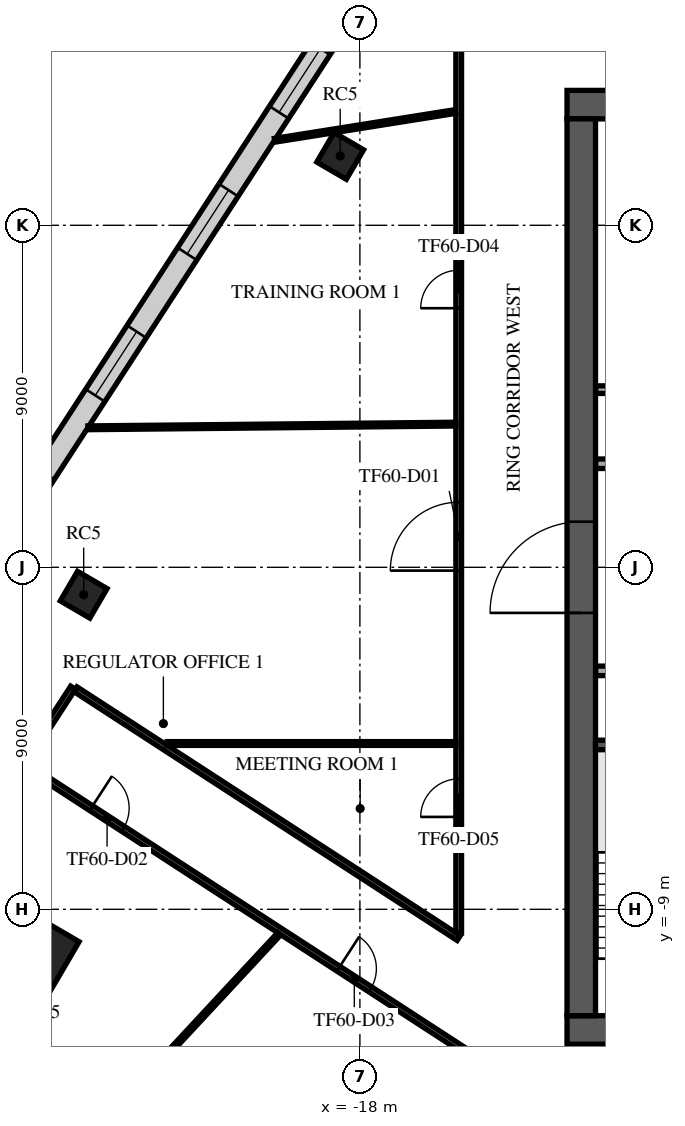
"""IFC4 building model, lengths in metres.
Left out: names, types, materials, properties, quantities, classifications, styles, units other than length and angle.
Written with IfcOpenShell. Run it as: python <this file> out.ifc"""

import sys

from ifc_helpers import new_model, si_unit, direction, frame, frame_2d, origin, origin_2d, place, context, subcontext, project, spatial, rectangle, extrude, element, fill, save


model = new_model("IFC4")
c1 = context("Model", 3, precision=1e-05, world=origin(), true_north=direction((0.0, 1.0)))
c2 = subcontext(c1, "Body", "Model", "MODEL_VIEW")
j1 = project(units=[si_unit("LENGTHUNIT", "METRE"), si_unit("PLANEANGLEUNIT", "RADIAN")], contexts=[c1])
p1 = place(None, origin())
s1 = spatial("IfcSite", under=j1, at=p1, CompositionType="ELEMENT")
p2 = place(p1, origin())
s2 = spatial("IfcBuilding", under=s1, at=p2, CompositionType="ELEMENT")
p3 = place(p2, frame((0.0, 0.0, 254.9)))
s3 = spatial("IfcBuildingStorey", under=s2, at=p3, CompositionType="ELEMENT", Elevation=254.9)
for number, where, z_axis, x_axis in (
    (1, (-18.518, 10.825, 0.0), (0.0, 0.0, 1.0), (0.505, 0.863, 0.0)),
    (2, (-25.268, -0.722, 0.0), (0.0, 0.0, 1.0), (0.505, 0.863, 0.0)),
):
    element("IfcColumn", number, at=place(p3, frame(where, z_axis=z_axis, x_axis=x_axis)), inside=s3, PredefinedType="COLUMN", context=c2, shape_type="SweptSolid", body=[
        extrude(rectangle(XDim=0.9, YDim=0.9, at=origin_2d()), origin(), (0.0, 0.0, 1.0), 4.0),
    ])
p4 = place(p3, frame((-26.415, -10.122, 0.0), z_axis=(0.0, 0.0, 1.0), x_axis=(0.504643651291, 0.863327739165, 0.0)))
e3 = element("IfcColumn", 3, at=p4, inside=s3, PredefinedType="COLUMN", context=c2, shape_type="SweptSolid", body=[
    extrude(rectangle(XDim=1.5, YDim=1.5, at=origin_2d()), origin(), (0.0, 0.0, 1.0), 4.0),
])
p5 = place(p3, frame((-12.55, 12.175, 0.0), z_axis=(0.0, 0.0, 1.0), x_axis=(1.0, 0.0, 0.0)))
e4 = element("IfcWall", 4, at=p5, inside=s3, PredefinedType="SHEAR", context=c2, shape_type="SweptSolid", body=[
    extrude(rectangle(XDim=25.1, YDim=0.75, at=frame_2d((12.55, 0.0))), origin(), (0.0, 0.0, 1.0), 3.64),
])
p6 = place(p5, frame((11.35, 0.0, 0.0)))
e5 = element("IfcOpeningElement", 5, at=p6, cuts=e4, PredefinedType="OPENING", context=c2, shape_type="SweptSolid", body=[
    extrude(rectangle(XDim=2.4, YDim=2.4, at=frame_2d((1.2, 1.2))), frame((0.0, 0.385, 0.0), z_axis=(0.0, -1.0, 0.0), x_axis=(1.0, 0.0, 0.0)), (0.0, 0.0, 1.0), 0.77),
])
p7 = place(p5, frame((22.175, 0.0, 0.0)))
e6 = element("IfcOpeningElement", 6, at=p7, cuts=e4, PredefinedType="OPENING", context=c2, shape_type="SweptSolid", body=[
    extrude(rectangle(XDim=1.2, YDim=2.1, at=frame_2d((0.6, 1.05))), frame((0.0, 0.385, 0.0), z_axis=(0.0, -1.0, 0.0), x_axis=(1.0, 0.0, 0.0)), (0.0, 0.0, 1.0), 0.77),
])
p8 = place(p5, frame((1.15, 0.0, 0.0)))
e7 = element("IfcOpeningElement", 7, at=p8, cuts=e4, PredefinedType="OPENING", context=c2, shape_type="SweptSolid", body=[
    extrude(rectangle(XDim=1.0, YDim=2.1, at=frame_2d((0.5, 1.05))), frame((0.0, 0.385, 0.0), z_axis=(0.0, -1.0, 0.0), x_axis=(1.0, 0.0, 0.0)), (0.0, 0.0, 1.0), 0.77),
])
p9 = place(p3, frame((-12.55, -12.175, 0.0), z_axis=(0.0, 0.0, 1.0), x_axis=(1.0, 0.0, 0.0)))
e8 = element("IfcWall", 8, at=p9, inside=s3, PredefinedType="SHEAR", context=c2, shape_type="SweptSolid", body=[
    extrude(rectangle(XDim=25.1, YDim=0.75, at=frame_2d((12.55, 0.0))), origin(), (0.0, 0.0, 1.0), 3.64),
])
p10 = place(p9, frame((7.45, 0.0, 0.0)))
e9 = element("IfcOpeningElement", 9, at=p10, cuts=e8, PredefinedType="OPENING", context=c2, shape_type="SweptSolid", body=[
    extrude(rectangle(XDim=2.0, YDim=2.1, at=frame_2d((1.0, 1.05))), frame((0.0, 0.385, 0.0), z_axis=(0.0, -1.0, 0.0), x_axis=(1.0, 0.0, 0.0)), (0.0, 0.0, 1.0), 0.77),
])
p11 = place(p9, frame((17.575, 0.0, 0.0)))
e10 = element("IfcOpeningElement", 10, at=p11, cuts=e8, PredefinedType="OPENING", context=c2, shape_type="SweptSolid", body=[
    extrude(rectangle(XDim=1.2, YDim=2.1, at=frame_2d((0.6, 1.05))), frame((0.0, 0.385, 0.0), z_axis=(0.0, -1.0, 0.0), x_axis=(1.0, 0.0, 0.0)), (0.0, 0.0, 1.0), 0.77),
])
p12 = place(p9, frame((1.725, 0.0, 0.0)))
e11 = element("IfcOpeningElement", 11, at=p12, cuts=e8, PredefinedType="OPENING", context=c2, shape_type="SweptSolid", body=[
    extrude(rectangle(XDim=1.2, YDim=2.1, at=frame_2d((0.6, 1.05))), frame((0.0, 0.385, 0.0), z_axis=(0.0, -1.0, 0.0), x_axis=(1.0, 0.0, 0.0)), (0.0, 0.0, 1.0), 0.77),
])
p13 = place(p9, frame((22.175, 0.0, 0.0)))
e12 = element("IfcOpeningElement", 12, at=p13, cuts=e8, PredefinedType="OPENING", context=c2, shape_type="SweptSolid", body=[
    extrude(rectangle(XDim=1.2, YDim=2.1, at=frame_2d((0.6, 1.05))), frame((0.0, 0.385, 0.0), z_axis=(0.0, -1.0, 0.0), x_axis=(1.0, 0.0, 0.0)), (0.0, 0.0, 1.0), 0.77),
])
p14 = place(p3, frame((-12.175, -11.8, 0.0), z_axis=(0.0, 0.0, 1.0), x_axis=(0.0, 1.0, 0.0)))
e13 = element("IfcWall", 13, at=p14, inside=s3, PredefinedType="SHEAR", context=c2, shape_type="SweptSolid", body=[
    extrude(rectangle(XDim=23.6, YDim=0.75, at=frame_2d((11.8, 0.0))), origin(), (0.0, 0.0, 1.0), 3.64),
])
p15 = place(p14, frame((10.6, 0.0, 0.0)))
e14 = element("IfcOpeningElement", 14, at=p15, cuts=e13, PredefinedType="OPENING", context=c2, shape_type="SweptSolid", body=[
    extrude(rectangle(XDim=2.4, YDim=2.4, at=frame_2d((1.2, 1.2))), frame((0.0, 0.385, 0.0), z_axis=(0.0, -1.0, 0.0), x_axis=(1.0, 0.0, 0.0)), (0.0, 0.0, 1.0), 0.77),
])
p16 = place(p3, frame((-8.65, -4.675, 0.0), z_axis=(0.0, 0.0, 1.0), x_axis=(-1.0, 0.0, 0.0)))
e15 = element("IfcWall", 15, at=p16, inside=s3, PredefinedType="SOLIDWALL", context=c2, shape_type="SweptSolid", body=[
    extrude(rectangle(XDim=3.15, YDim=0.25, at=frame_2d((1.575, 0.0))), origin(), (0.0, 0.0, 1.0), 3.64),
])
p17 = place(p3, frame((-11.795, -2.725, 0.0), z_axis=(0.0, 0.0, 1.0), x_axis=(1.0, 0.0, 0.0)))
e16 = element("IfcWall", 16, at=p17, inside=s3, PredefinedType="PARTITIONING", context=c2, shape_type="SweptSolid", body=[
    extrude(rectangle(XDim=14.415, YDim=0.25, at=frame_2d((7.208, 0.0))), origin(), (0.0, 0.0, 1.0), 3.64),
])
p18 = place(p17, frame((1.295, 0.0, 0.0)))
e17 = element("IfcOpeningElement", 17, at=p18, cuts=e16, PredefinedType="OPENING", context=c2, shape_type="SweptSolid", body=[
    extrude(rectangle(XDim=1.0, YDim=2.1, at=frame_2d((0.5, 1.05))), frame((0.0, 0.135, 0.0), z_axis=(0.0, -1.0, 0.0), x_axis=(1.0, 0.0, 0.0)), (0.0, 0.0, 1.0), 0.27),
])
p19 = place(p17, frame((4.42, 0.0, 0.0)))
e18 = element("IfcOpeningElement", 18, at=p19, cuts=e16, PredefinedType="OPENING", context=c2, shape_type="SweptSolid", body=[
    extrude(rectangle(XDim=1.0, YDim=2.1, at=frame_2d((0.5, 1.05))), frame((0.0, 0.135, 0.0), z_axis=(0.0, -1.0, 0.0), x_axis=(1.0, 0.0, 0.0)), (0.0, 0.0, 1.0), 0.27),
])
p20 = place(p17, frame((9.92, 0.0, 0.0)))
e19 = element("IfcOpeningElement", 19, at=p20, cuts=e16, PredefinedType="OPENING", context=c2, shape_type="SweptSolid", body=[
    extrude(rectangle(XDim=1.0, YDim=2.1, at=frame_2d((0.5, 1.05))), frame((0.0, 0.135, 0.0), z_axis=(0.0, -1.0, 0.0), x_axis=(1.0, 0.0, 0.0)), (0.0, 0.0, 1.0), 0.27),
])
p21 = place(p3, frame((-11.795, 2.725, 0.0), z_axis=(0.0, 0.0, 1.0), x_axis=(1.0, 0.0, 0.0)))
e20 = element("IfcWall", 20, at=p21, inside=s3, PredefinedType="PARTITIONING", context=c2, shape_type="SweptSolid", body=[
    extrude(rectangle(XDim=23.59, YDim=0.25, at=frame_2d((11.795, 0.0))), origin(), (0.0, 0.0, 1.0), 3.64),
])
p22 = place(p21, frame((21.345, 0.0, 0.0)))
e21 = element("IfcOpeningElement", 21, at=p22, cuts=e20, PredefinedType="OPENING", context=c2, shape_type="SweptSolid", body=[
    extrude(rectangle(XDim=0.9, YDim=2.1, at=frame_2d((0.45, 1.05))), frame((0.0, 0.135, 0.0), z_axis=(0.0, -1.0, 0.0), x_axis=(1.0, 0.0, 0.0)), (0.0, 0.0, 1.0), 0.27),
])
p23 = place(p21, frame((1.345, 0.0, 0.0)))
e22 = element("IfcOpeningElement", 22, at=p23, cuts=e20, PredefinedType="OPENING", context=c2, shape_type="SweptSolid", body=[
    extrude(rectangle(XDim=0.9, YDim=2.1, at=frame_2d((0.45, 1.05))), frame((0.0, 0.135, 0.0), z_axis=(0.0, -1.0, 0.0), x_axis=(1.0, 0.0, 0.0)), (0.0, 0.0, 1.0), 0.27),
])
p24 = place(p21, frame((4.32, 0.0, 0.0)))
e23 = element("IfcOpeningElement", 23, at=p24, cuts=e20, PredefinedType="OPENING", context=c2, shape_type="SweptSolid", body=[
    extrude(rectangle(XDim=1.2, YDim=2.1, at=frame_2d((0.6, 1.05))), frame((0.0, 0.135, 0.0), z_axis=(0.0, -1.0, 0.0), x_axis=(1.0, 0.0, 0.0)), (0.0, 0.0, 1.0), 0.27),
])
p25 = place(p21, frame((12.57, 0.0, 0.0)))
e24 = element("IfcOpeningElement", 24, at=p25, cuts=e20, PredefinedType="OPENING", context=c2, shape_type="SweptSolid", body=[
    extrude(rectangle(XDim=1.2, YDim=2.1, at=frame_2d((0.6, 1.05))), frame((0.0, 0.135, 0.0), z_axis=(0.0, -1.0, 0.0), x_axis=(1.0, 0.0, 0.0)), (0.0, 0.0, 1.0), 0.27),
])
p26 = place(p3, frame((-11.795, 4.675, 0.0), z_axis=(0.0, 0.0, 1.0), x_axis=(1.0, 0.0, 0.0)))
e25 = element("IfcWall", 25, at=p26, inside=s3, PredefinedType="PARTITIONING", context=c2, shape_type="SweptSolid", body=[
    extrude(rectangle(XDim=3.645, YDim=0.2, at=frame_2d((1.823, 0.0))), origin(), (0.0, 0.0, 1.0), 3.64),
])
p27 = place(p3, frame((-6.281, 33.292, 0.0), z_axis=(0.0, 0.0, 1.0), x_axis=(-0.544637268583, -0.838671715077, 0.0)))
e26 = element("IfcWall", 26, at=p27, inside=s3, PredefinedType="STANDARD", context=c2, shape_type="SweptSolid", body=[
    extrude(rectangle(XDim=48.843, YDim=0.6, at=frame_2d((24.422, 0.0))), origin(), (0.0, 0.0, 1.0), 3.64),
])
p28 = place(p27, frame((1.22, 0.0, 0.9)))
e27 = element("IfcOpeningElement", 27, at=p28, cuts=e26, PredefinedType="OPENING", context=c2, shape_type="SweptSolid", body=[
    extrude(rectangle(XDim=2.0, YDim=2.1, at=frame_2d((1.0, 1.05))), frame((0.0, 0.31, 0.0), z_axis=(0.0, -1.0, 0.0), x_axis=(1.0, 0.0, 0.0)), (0.0, 0.0, 1.0), 0.62),
])
p29 = place(p27, frame((5.66, 0.0, 0.9)))
e28 = element("IfcOpeningElement", 28, at=p29, cuts=e26, PredefinedType="OPENING", context=c2, shape_type="SweptSolid", body=[
    extrude(rectangle(XDim=2.0, YDim=2.1, at=frame_2d((1.0, 1.05))), frame((0.0, 0.31, 0.0), z_axis=(0.0, -1.0, 0.0), x_axis=(1.0, 0.0, 0.0)), (0.0, 0.0, 1.0), 0.62),
])
p30 = place(p27, frame((14.541, 0.0, 0.9)))
e29 = element("IfcOpeningElement", 29, at=p30, cuts=e26, PredefinedType="OPENING", context=c2, shape_type="SweptSolid", body=[
    extrude(rectangle(XDim=2.0, YDim=2.1, at=frame_2d((1.0, 1.05))), frame((0.0, 0.31, 0.0), z_axis=(0.0, -1.0, 0.0), x_axis=(1.0, 0.0, 0.0)), (0.0, 0.0, 1.0), 0.62),
])
p31 = place(p27, frame((18.981, 0.0, 0.9)))
e30 = element("IfcOpeningElement", 30, at=p31, cuts=e26, PredefinedType="OPENING", context=c2, shape_type="SweptSolid", body=[
    extrude(rectangle(XDim=2.0, YDim=2.1, at=frame_2d((1.0, 1.05))), frame((0.0, 0.31, 0.0), z_axis=(0.0, -1.0, 0.0), x_axis=(1.0, 0.0, 0.0)), (0.0, 0.0, 1.0), 0.62),
])
p32 = place(p27, frame((23.422, 0.0, 0.9)))
e31 = element("IfcOpeningElement", 31, at=p32, cuts=e26, PredefinedType="OPENING", context=c2, shape_type="SweptSolid", body=[
    extrude(rectangle(XDim=2.0, YDim=2.1, at=frame_2d((1.0, 1.05))), frame((0.0, 0.31, 0.0), z_axis=(0.0, -1.0, 0.0), x_axis=(1.0, 0.0, 0.0)), (0.0, 0.0, 1.0), 0.62),
])
p33 = place(p27, frame((27.862, 0.0, 0.9)))
e32 = element("IfcOpeningElement", 32, at=p33, cuts=e26, PredefinedType="OPENING", context=c2, shape_type="SweptSolid", body=[
    extrude(rectangle(XDim=2.0, YDim=2.1, at=frame_2d((1.0, 1.05))), frame((0.0, 0.31, 0.0), z_axis=(0.0, -1.0, 0.0), x_axis=(1.0, 0.0, 0.0)), (0.0, 0.0, 1.0), 0.62),
])
p34 = place(p27, frame((32.302, 0.0, 0.9)))
e33 = element("IfcOpeningElement", 33, at=p34, cuts=e26, PredefinedType="OPENING", context=c2, shape_type="SweptSolid", body=[
    extrude(rectangle(XDim=2.0, YDim=2.1, at=frame_2d((1.0, 1.05))), frame((0.0, 0.31, 0.0), z_axis=(0.0, -1.0, 0.0), x_axis=(1.0, 0.0, 0.0)), (0.0, 0.0, 1.0), 0.62),
])
p35 = place(p27, frame((36.742, 0.0, 0.9)))
e34 = element("IfcOpeningElement", 34, at=p35, cuts=e26, PredefinedType="OPENING", context=c2, shape_type="SweptSolid", body=[
    extrude(rectangle(XDim=2.0, YDim=2.1, at=frame_2d((1.0, 1.05))), frame((0.0, 0.31, 0.0), z_axis=(0.0, -1.0, 0.0), x_axis=(1.0, 0.0, 0.0)), (0.0, 0.0, 1.0), 0.62),
])
p36 = place(p27, frame((41.183, 0.0, 0.9)))
e35 = element("IfcOpeningElement", 35, at=p36, cuts=e26, PredefinedType="OPENING", context=c2, shape_type="SweptSolid", body=[
    extrude(rectangle(XDim=2.0, YDim=2.1, at=frame_2d((1.0, 1.05))), frame((0.0, 0.31, 0.0), z_axis=(0.0, -1.0, 0.0), x_axis=(1.0, 0.0, 0.0)), (0.0, 0.0, 1.0), 0.62),
])
p37 = place(p27, frame((45.623, 0.0, 0.9)))
e36 = element("IfcOpeningElement", 36, at=p37, cuts=e26, PredefinedType="OPENING", context=c2, shape_type="SweptSolid", body=[
    extrude(rectangle(XDim=2.0, YDim=2.1, at=frame_2d((1.0, 1.05))), frame((0.0, 0.31, 0.0), z_axis=(0.0, -1.0, 0.0), x_axis=(1.0, 0.0, 0.0)), (0.0, 0.0, 1.0), 0.62),
])
p38 = place(p3, frame((-26.854, -5.18, 0.0), z_axis=(0.0, 0.0, 1.0), x_axis=(0.544727214821, 0.838613296719, 0.0)))
e37 = element("IfcWall", 37, at=p38, inside=s3, PredefinedType="PARTITIONING", context=c2, shape_type="SweptSolid", body=[
    extrude(rectangle(XDim=2.399, YDim=0.15, at=frame_2d((1.2, 0.0))), origin(), (0.0, 0.0, 1.0), 3.04),
])
p39 = place(p3, frame((-26.791, -5.221, 0.0), z_axis=(0.0, 0.0, 1.0), x_axis=(0.838671905754, -0.544636974965, 0.0)))
e38 = element("IfcWall", 38, at=p39, inside=s3, PredefinedType="PARTITIONING", context=c2, shape_type="SweptSolid", body=[
    extrude(rectangle(XDim=39.325, YDim=0.15, at=frame_2d((19.663, 0.0))), origin(), (0.0, 0.0, 1.0), 3.04),
])
p40 = place(p39, frame((2.05, 0.0, 0.0)))
e39 = element("IfcOpeningElement", 39, at=p40, cuts=e38, PredefinedType="OPENING", context=c2, shape_type="SweptSolid", body=[
    extrude(rectangle(XDim=1.0, YDim=2.1, at=frame_2d((0.5, 1.05))), frame((0.0, 0.085, 0.0), z_axis=(0.0, -1.0, 0.0), x_axis=(1.0, 0.0, 0.0)), (0.0, 0.0, 1.0), 0.17),
])
p41 = place(p39, frame((9.807, 0.0, 0.0)))
e40 = element("IfcOpeningElement", 40, at=p41, cuts=e38, PredefinedType="OPENING", context=c2, shape_type="SweptSolid", body=[
    extrude(rectangle(XDim=1.0, YDim=2.1, at=frame_2d((0.5, 1.05))), frame((0.0, 0.085, 0.0), z_axis=(0.0, -1.0, 0.0), x_axis=(1.0, 0.0, 0.0)), (0.0, 0.0, 1.0), 0.17),
])
p42 = place(p39, frame((18.866, 0.0, 0.0)))
e41 = element("IfcOpeningElement", 41, at=p42, cuts=e38, PredefinedType="OPENING", context=c2, shape_type="SweptSolid", body=[
    extrude(rectangle(XDim=1.0, YDim=2.1, at=frame_2d((0.5, 1.05))), frame((0.0, 0.085, 0.0), z_axis=(0.0, -1.0, 0.0), x_axis=(1.0, 0.0, 0.0)), (0.0, 0.0, 1.0), 0.17),
])
p43 = place(p39, frame((25.009, 0.0, 0.0)))
e42 = element("IfcOpeningElement", 42, at=p43, cuts=e38, PredefinedType="OPENING", context=c2, shape_type="SweptSolid", body=[
    extrude(rectangle(XDim=1.0, YDim=2.1, at=frame_2d((0.5, 1.05))), frame((0.0, 0.085, 0.0), z_axis=(0.0, -1.0, 0.0), x_axis=(1.0, 0.0, 0.0)), (0.0, 0.0, 1.0), 0.17),
])
p44 = place(p39, frame((36.069, 0.0, 0.0)))
e43 = element("IfcOpeningElement", 43, at=p44, cuts=e38, PredefinedType="OPENING", context=c2, shape_type="SweptSolid", body=[
    extrude(rectangle(XDim=1.8, YDim=2.1, at=frame_2d((0.9, 1.05))), frame((0.0, 0.085, 0.0), z_axis=(0.0, -1.0, 0.0), x_axis=(1.0, 0.0, 0.0)), (0.0, 0.0, 1.0), 0.17),
])
p45 = place(p3, frame((-25.484, -3.209, 0.0), z_axis=(0.0, 0.0, 1.0), x_axis=(0.838696356723, -0.544599321721, 0.0)))
e44 = element("IfcWall", 44, at=p45, inside=s3, PredefinedType="PARTITIONING", context=c2, shape_type="SweptSolid", body=[
    extrude(rectangle(XDim=12.024, YDim=0.15, at=frame_2d((6.012, 0.0))), origin(), (0.0, 0.0, 1.0), 3.04),
])
p46 = place(p3, frame((-15.4, -9.619, 0.0), z_axis=(0.0, 0.0, 1.0), x_axis=(0.0, 1.0, 0.0)))
e45 = element("IfcWall", 45, at=p46, inside=s3, PredefinedType="PARTITIONING", context=c2, shape_type="SweptSolid", body=[
    extrude(rectangle(XDim=25.019, YDim=0.15, at=frame_2d((12.509, 0.0))), origin(), (0.0, 0.0, 1.0), 3.24),
])
p47 = place(p46, frame((9.532, 0.0, 0.0)))
e46 = element("IfcOpeningElement", 46, at=p47, cuts=e45, PredefinedType="OPENING", context=c2, shape_type="SweptSolid", body=[
    extrude(rectangle(XDim=1.8, YDim=2.1, at=frame_2d((0.9, 1.05))), frame((0.0, 0.085, 0.0), z_axis=(0.0, -1.0, 0.0), x_axis=(1.0, 0.0, 0.0)), (0.0, 0.0, 1.0), 0.17),
])
p48 = place(p46, frame((16.437, 0.0, 0.0)))
e47 = element("IfcOpeningElement", 47, at=p48, cuts=e45, PredefinedType="OPENING", context=c2, shape_type="SweptSolid", body=[
    extrude(rectangle(XDim=1.0, YDim=2.1, at=frame_2d((0.5, 1.05))), frame((0.0, 0.085, 0.0), z_axis=(0.0, -1.0, 0.0), x_axis=(1.0, 0.0, 0.0)), (0.0, 0.0, 1.0), 0.17),
])
p49 = place(p46, frame((3.05, 0.0, 0.0)))
e48 = element("IfcOpeningElement", 48, at=p49, cuts=e45, PredefinedType="OPENING", context=c2, shape_type="SweptSolid", body=[
    extrude(rectangle(XDim=1.0, YDim=2.1, at=frame_2d((0.5, 1.05))), frame((0.0, 0.085, 0.0), z_axis=(0.0, -1.0, 0.0), x_axis=(1.0, 0.0, 0.0)), (0.0, 0.0, 1.0), 0.17),
])
p50 = place(p3, frame((-27.274, -17.341, 0.0), z_axis=(0.0, 0.0, 1.0), x_axis=(0.680597347882, 0.732657662252, 0.0)))
e49 = element("IfcWall", 49, at=p50, inside=s3, PredefinedType="PARTITIONING", context=c2, shape_type="SweptSolid", body=[
    extrude(rectangle(XDim=10.5, YDim=0.1, at=frame_2d((5.25, 0.0))), origin(), (0.0, 0.0, 1.0), 3.04),
])
p51 = place(p3, frame((-25.157, 3.671, 0.0), z_axis=(0.0, 0.0, 1.0), x_axis=(0.999950644633, 0.009935204993, 0.0)))
e50 = element("IfcWall", 50, at=p51, inside=s3, PredefinedType="PARTITIONING", context=c2, shape_type="SweptSolid", body=[
    extrude(rectangle(XDim=9.682, YDim=0.1, at=frame_2d((4.841, 0.0))), origin(), (0.0, 0.0, 1.0), 3.04),
])
p52 = place(p3, frame((-23.069, -4.637, 0.0), z_axis=(0.0, 0.0, 1.0), x_axis=(1.0, 0.0, 0.0)))
e51 = element("IfcWall", 51, at=p52, inside=s3, PredefinedType="PARTITIONING", context=c2, shape_type="SweptSolid", body=[
    extrude(rectangle(XDim=7.594, YDim=0.1, at=frame_2d((3.797, 0.0))), origin(), (0.0, 0.0, 1.0), 3.64),
])
p53 = place(p3, frame((-20.244, 11.237, 0.0), z_axis=(0.0, 0.0, 1.0), x_axis=(0.987553505834, 0.157283416528, 0.0)))
e52 = element("IfcWall", 52, at=p53, inside=s3, PredefinedType="PARTITIONING", context=c2, shape_type="SweptSolid", body=[
    extrude(rectangle(XDim=4.821, YDim=0.1, at=frame_2d((2.411, 0.0))), origin(), (0.0, 0.0, 1.0), 3.04),
])
p54 = place(p15, origin())
e53 = element("IfcDoor", 53, at=p54, inside=s3, OperationType="SINGLE_SWING_LEFT", PredefinedType="DOOR", context=c2, shape_type="SweptSolid", body=[
    extrude(rectangle(XDim=2.4, YDim=2.4, at=frame_2d((1.2, 1.2))), frame((0.0, 0.025, 0.0), z_axis=(0.0, -1.0, 0.0), x_axis=(1.0, 0.0, 0.0)), (0.0, 0.0, 1.0), 0.05),
])
fill(e14, e53)
p55 = place(p32, origin())
e54 = element("IfcWindow", 54, at=p55, inside=s3, PartitioningType="SINGLE_PANEL", PredefinedType="WINDOW", context=c2, shape_type="SweptSolid", body=[
    extrude(rectangle(XDim=2.0, YDim=2.1, at=frame_2d((1.0, 1.05))), frame((0.0, 0.03, 0.0), z_axis=(0.0, -1.0, 0.0), x_axis=(1.0, 0.0, 0.0)), (0.0, 0.0, 1.0), 0.06),
])
fill(e31, e54)
p56 = place(p33, origin())
e55 = element("IfcWindow", 55, at=p56, inside=s3, PartitioningType="SINGLE_PANEL", PredefinedType="WINDOW", context=c2, shape_type="SweptSolid", body=[
    extrude(rectangle(XDim=2.0, YDim=2.1, at=frame_2d((1.0, 1.05))), frame((0.0, 0.03, 0.0), z_axis=(0.0, -1.0, 0.0), x_axis=(1.0, 0.0, 0.0)), (0.0, 0.0, 1.0), 0.06),
])
fill(e32, e55)
p57 = place(p34, origin())
e56 = element("IfcWindow", 56, at=p57, inside=s3, PartitioningType="SINGLE_PANEL", PredefinedType="WINDOW", context=c2, shape_type="SweptSolid", body=[
    extrude(rectangle(XDim=2.0, YDim=2.1, at=frame_2d((1.0, 1.05))), frame((0.0, 0.03, 0.0), z_axis=(0.0, -1.0, 0.0), x_axis=(1.0, 0.0, 0.0)), (0.0, 0.0, 1.0), 0.06),
])
fill(e33, e56)
p58 = place(p47, origin())
e57 = element("IfcDoor", 57, at=p58, inside=s3, OperationType="DOUBLE_DOOR_SINGLE_SWING", PredefinedType="DOOR", context=c2, shape_type="SweptSolid", body=[
    extrude(rectangle(XDim=1.8, YDim=2.1, at=frame_2d((0.9, 1.05))), frame((0.0, 0.025, 0.0), z_axis=(0.0, -1.0, 0.0), x_axis=(1.0, 0.0, 0.0)), (0.0, 0.0, 1.0), 0.05),
])
fill(e46, e57)
p59 = place(p40, frame((1.0, 0.0, 0.0), z_axis=(0.0, 0.0, 1.0), x_axis=(-1.0, 0.0, 0.0)))
e58 = element("IfcDoor", 58, at=p59, inside=s3, OperationType="SINGLE_SWING_LEFT", PredefinedType="DOOR", context=c2, shape_type="SweptSolid", body=[
    extrude(rectangle(XDim=1.0, YDim=2.1, at=frame_2d((0.5, 1.05))), frame((0.0, 0.025, 0.0), z_axis=(0.0, -1.0, 0.0), x_axis=(1.0, 0.0, 0.0)), (0.0, 0.0, 1.0), 0.05),
])
fill(e39, e58)
p60 = place(p41, frame((1.0, 0.0, 0.0), z_axis=(0.0, 0.0, 1.0), x_axis=(-1.0, 0.0, 0.0)))
e59 = element("IfcDoor", 59, at=p60, inside=s3, OperationType="SINGLE_SWING_LEFT", PredefinedType="DOOR", context=c2, shape_type="SweptSolid", body=[
    extrude(rectangle(XDim=1.0, YDim=2.1, at=frame_2d((0.5, 1.05))), frame((0.0, 0.025, 0.0), z_axis=(0.0, -1.0, 0.0), x_axis=(1.0, 0.0, 0.0)), (0.0, 0.0, 1.0), 0.05),
])
fill(e40, e59)
p61 = place(p48, origin())
e60 = element("IfcDoor", 60, at=p61, inside=s3, OperationType="SINGLE_SWING_LEFT", PredefinedType="DOOR", context=c2, shape_type="SweptSolid", body=[
    extrude(rectangle(XDim=1.0, YDim=2.1, at=frame_2d((0.5, 1.05))), frame((0.0, 0.025, 0.0), z_axis=(0.0, -1.0, 0.0), x_axis=(1.0, 0.0, 0.0)), (0.0, 0.0, 1.0), 0.05),
])
fill(e47, e60)
p62 = place(p49, origin())
e61 = element("IfcDoor", 61, at=p62, inside=s3, OperationType="SINGLE_SWING_LEFT", PredefinedType="DOOR", context=c2, shape_type="SweptSolid", body=[
    extrude(rectangle(XDim=1.0, YDim=2.1, at=frame_2d((0.5, 1.05))), frame((0.0, 0.025, 0.0), z_axis=(0.0, -1.0, 0.0), x_axis=(1.0, 0.0, 0.0)), (0.0, 0.0, 1.0), 0.05),
])
fill(e48, e61)
save(model, sys.argv[1])
